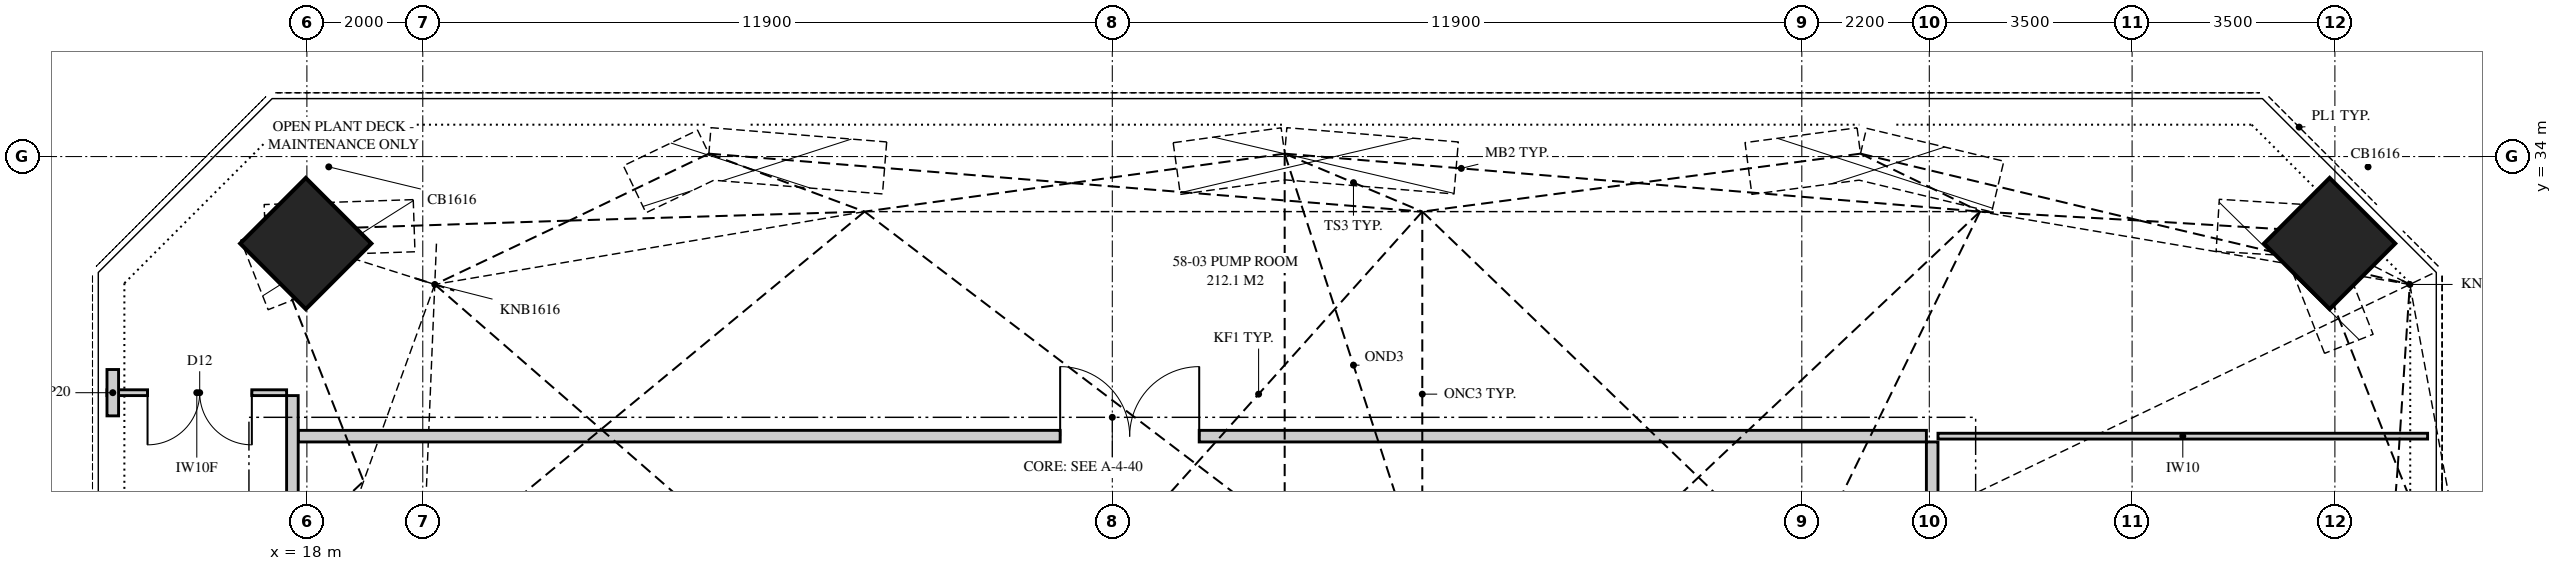
"""IFC4 building model, lengths in metres.
Left out: names, types, materials, properties, quantities, classifications, styles, units other than length and angle.
Written with IfcOpenShell. Run it as: python <this file> out.ifc"""

import sys

from ifc_helpers import new_model, si_unit, direction, frame, frame_2d, origin, origin_2d, place, context, subcontext, project, spatial, polyline, rectangle, hollow_rectangle, outline, extrude, element, fill, save


model = new_model("IFC4")
c1 = context("Model", 3, precision=1e-05, world=origin(), true_north=direction((0.0, 1.0)))
c2 = subcontext(c1, "Body", "Model", "MODEL_VIEW")
j1 = project(units=[si_unit("LENGTHUNIT", "METRE"), si_unit("PLANEANGLEUNIT", "RADIAN")], contexts=[c1])
p1 = place(None, origin())
s1 = spatial("IfcSite", under=j1, at=p1, CompositionType="ELEMENT")
p2 = place(p1, origin())
s2 = spatial("IfcBuilding", under=s1, at=p2, CompositionType="ELEMENT")
p3 = place(p2, frame((0.0, 0.0, 212.95)))
s3 = spatial("IfcBuildingStorey", under=s2, at=p3, CompositionType="ELEMENT", Elevation=212.95)
p4 = place(p3, frame((52.472, 32.722, 0.0), z_axis=(0.337077111073, -0.172018702701, 0.925628752315), x_axis=(-0.67232442619, -0.732223798668, 0.108757411758)))
e1 = element("IfcColumn", 1, at=p4, inside=s3, PredefinedType="COLUMN", context=c2, shape_type="SweptSolid", body=[
    extrude(hollow_rectangle(XDim=1.6, YDim=1.6, WallThickness=0.125, at=origin_2d()), origin(), (0.0, 0.0, 1.0), 4.994),
])
p5 = place(p3, frame((17.278, 32.722, 0.0), z_axis=(0.499107987003, -0.158326804345, 0.851952956645), x_axis=(0.536600054158, -0.715509962871, -0.447331951586)))
e2 = element("IfcColumn", 2, at=p5, inside=s3, PredefinedType="COLUMN", context=c2, shape_type="SweptSolid", body=[
    extrude(hollow_rectangle(XDim=1.6, YDim=1.6, WallThickness=0.125, at=origin_2d()), origin(), (0.0, 0.0, 1.0), 5.193),
])
p6 = place(p3, frame((17.85, 29.175, 0.0), z_axis=(0.0, 0.0, 1.0), x_axis=(1.0, 0.0, 0.0)))
e3 = element("IfcWall", 3, at=p6, inside=s3, PredefinedType="PARTITIONING", context=c2, shape_type="SweptSolid", body=[
    extrude(outline(polyline([(0.23, 4.72), (0.0, 4.72), (0.0, 0.0), (28.1, 0.0), (28.1, 4.72), (27.445, 4.72), (27.445, 4.141), (26.822, 4.141), (26.822, 4.72), (25.369, 4.72), (25.369, 4.141), (24.469, 4.141), (24.469, 4.72), (23.874, 4.72), (23.874, 4.141), (22.984, 4.141), (22.984, 4.72), (19.656, 4.72), (19.656, 4.245), (19.144, 4.245), (19.144, 4.72), (16.332, 4.72), (16.332, 4.141), (15.518, 4.141), (15.518, 4.72), (15.386, 4.72), (15.386, 4.141), (14.344, 4.141), (14.344, 4.72), (5.839, 4.72), (5.839, 4.141), (4.593, 4.141), (4.593, 4.72), (2.754, 4.72), (2.754, 3.52), (2.591, 3.52), (2.591, 3.5), (1.302, 3.5), (1.302, 3.046), (1.221, 2.809), (0.343, 2.463), (0.343, 3.5), (0.23, 3.5), (0.23, 4.72)]), holes=[polyline([(18.387, 3.083), (18.903, 3.187), (18.903, 2.666), (18.835, 2.522), (18.319, 2.418), (18.319, 2.939), (18.387, 3.083)])]), frame((0.0, 0.1, 0.0), z_axis=(0.0, -1.0, 0.0), x_axis=(1.0, 0.0, 0.0)), (0.0, 0.0, 1.0), 0.2),
])
p7 = place(p6, frame((13.15, 0.0, 0.0)))
e4 = element("IfcOpeningElement", 4, at=p7, cuts=e3, PredefinedType="OPENING", context=c2, shape_type="SweptSolid", body=[
    extrude(rectangle(XDim=2.4, YDim=2.4, at=frame_2d((1.2, 1.2))), frame((0.0, 0.11, 0.0), z_axis=(0.0, -1.0, 0.0), x_axis=(1.0, 0.0, 0.0)), (0.0, 0.0, 1.0), 0.22),
])
p8 = place(p3, frame((17.75, 27.525, 0.0), z_axis=(0.0, 0.0, 1.0), x_axis=(0.0, 1.0, 0.0)))
e5 = element("IfcWall", 5, at=p8, inside=s3, PredefinedType="PARTITIONING", context=c2, shape_type="SweptSolid", body=[
    extrude(outline(polyline([(0.0, 0.0), (2.35, 0.0), (2.35, 4.72), (0.738, 4.72), (0.738, 3.5), (0.373, 3.5), (0.373, 2.501), (0.183, 2.221), (0.0, 2.096), (0.0, 0.0)])), frame((0.0, 0.1, 0.0), z_axis=(0.0, -1.0, 0.0), x_axis=(1.0, 0.0, 0.0)), (0.0, 0.0, 1.0), 0.2),
])
p9 = place(p3, frame((46.05, 27.525, 0.0), z_axis=(0.0, 0.0, 1.0), x_axis=(0.0, 1.0, 0.0)))
e6 = element("IfcWall", 6, at=p9, inside=s3, PredefinedType="PARTITIONING", context=c2, shape_type="SweptSolid", body=[
    extrude(outline(polyline([(0.0, 0.0), (1.55, 0.0), (1.55, 4.72), (0.909, 4.72), (0.909, 3.52), (0.0, 3.52), (0.0, 0.0)])), frame((0.0, 0.1, 0.0), z_axis=(0.0, -1.0, 0.0), x_axis=(1.0, 0.0, 0.0)), (0.0, 0.0, 1.0), 0.2),
])
p10 = place(p3, frame((14.55, 29.925, 0.0), z_axis=(0.0, 0.0, 1.0), x_axis=(1.0, 0.0, 0.0)))
e7 = element("IfcWall", 7, at=p10, inside=s3, PredefinedType="PARTITIONING", context=c2, shape_type="SweptSolid", body=[
    extrude(rectangle(XDim=3.1, YDim=0.1, at=frame_2d((1.55, 0.0))), origin(), (0.0, 0.0, 1.0), 4.72),
])
p11 = place(p10, frame((0.7, 0.0, 0.0)))
e8 = element("IfcOpeningElement", 8, at=p11, cuts=e7, PredefinedType="OPENING", context=c2, shape_type="SweptSolid", body=[
    extrude(rectangle(XDim=1.8, YDim=2.1, at=frame_2d((0.9, 1.05))), frame((0.0, 0.06, 0.0), z_axis=(0.0, -1.0, 0.0), x_axis=(1.0, 0.0, 0.0)), (0.0, 0.0, 1.0), 0.12),
])
p12 = place(p3, frame((46.15, 29.175, 0.0), z_axis=(0.0, 0.0, 1.0), x_axis=(1.0, 0.0, 0.0)))
e9 = element("IfcWall", 9, at=p12, inside=s3, PredefinedType="PARTITIONING", context=c2, shape_type="SweptSolid", body=[
    extrude(outline(polyline([(1.438, 4.72), (0.0, 4.72), (0.0, 0.0), (8.45, 0.0), (8.45, 1.751), (8.176, 1.751), (8.176, 1.208), (8.133, 1.137), (7.257, 0.944), (7.257, 1.894), (7.3, 1.964), (7.556, 2.021), (7.556, 2.756), (7.563, 2.839), (8.384, 2.879), (8.45, 2.879), (8.45, 3.5), (7.549, 3.5), (7.549, 4.72), (3.954, 4.72), (3.954, 3.52), (1.438, 3.52), (1.438, 4.72)])), frame((0.0, 0.05, 0.0), z_axis=(0.0, -1.0, 0.0), x_axis=(1.0, 0.0, 0.0)), (0.0, 0.0, 1.0), 0.1),
])
p13 = place(p3, frame((14.65, 29.525, 0.0), z_axis=(0.0, 0.0, 1.0), x_axis=(0.0, 1.0, 0.0)))
e10 = element("IfcWall", 10, at=p13, inside=s3, PredefinedType="SOLIDWALL", context=c2, shape_type="SweptSolid", body=[
    extrude(rectangle(XDim=0.8, YDim=0.2, at=frame_2d((0.4, 0.0))), origin(), (0.0, 0.0, 1.0), 4.72),
])
p14 = place(p7, origin())
e11 = element("IfcDoor", 11, at=p14, inside=s3, OperationType="DOUBLE_DOOR_SINGLE_SWING", PredefinedType="DOOR", context=c2, shape_type="SweptSolid", body=[
    extrude(rectangle(XDim=2.4, YDim=2.4, at=frame_2d((1.2, 1.2))), frame((0.0, 0.025, 0.0), z_axis=(0.0, -1.0, 0.0), x_axis=(1.0, 0.0, 0.0)), (0.0, 0.0, 1.0), 0.05),
])
fill(e4, e11)
p15 = place(p11, frame((1.8, 0.0, 0.0), z_axis=(0.0, 0.0, 1.0), x_axis=(-1.0, 0.0, 0.0)))
e12 = element("IfcDoor", 12, at=p15, inside=s3, OperationType="DOUBLE_DOOR_SINGLE_SWING", PredefinedType="DOOR", context=c2, shape_type="SweptSolid", body=[
    extrude(rectangle(XDim=1.8, YDim=2.1, at=frame_2d((0.9, 1.05))), frame((0.0, 0.025, 0.0), z_axis=(0.0, -1.0, 0.0), x_axis=(1.0, 0.0, 0.0)), (0.0, 0.0, 1.0), 0.05),
])
fill(e8, e12)
save(model, sys.argv[1])
